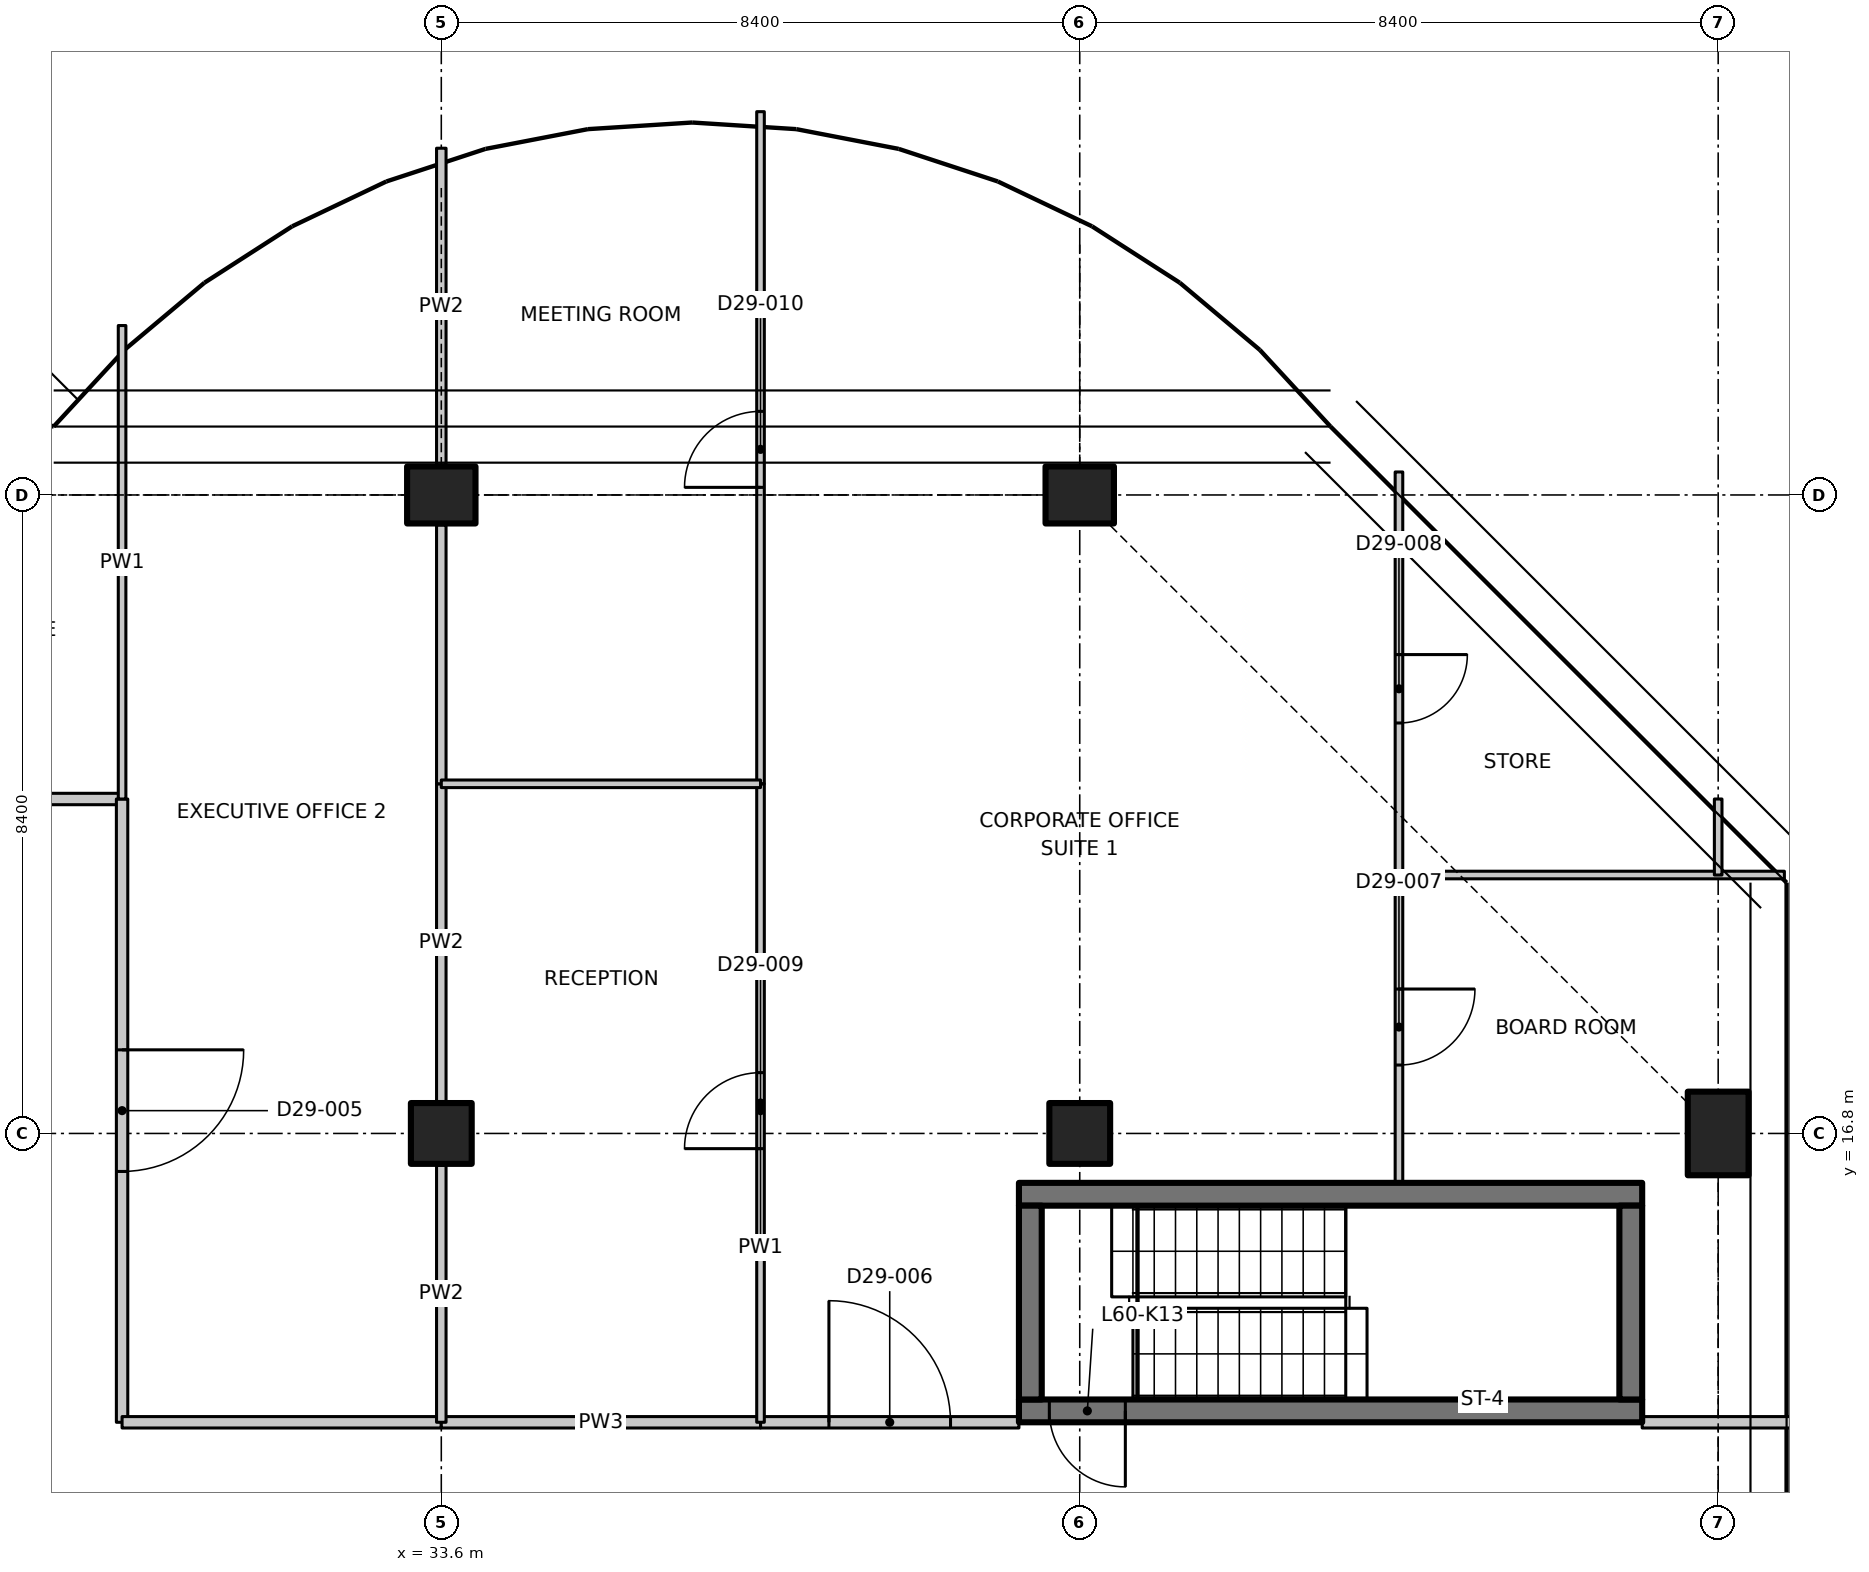
"""IFC4 building model, lengths in metres.
Left out: names, types, materials, properties, quantities, classifications, styles, units other than length and angle.
Written with IfcOpenShell. Run it as: python <this file> out.ifc"""

import sys

from ifc_helpers import new_model, si_unit, direction, frame, frame_2d, origin, origin_2d, place, context, subcontext, project, spatial, polyline, rectangle, outline, extrude, element, fill, save


model = new_model("IFC4")
c1 = context("Model", 3, precision=1e-05, world=origin(), true_north=direction((0.0, 1.0)))
c2 = subcontext(c1, "Body", "Model", "MODEL_VIEW")
j1 = project(units=[si_unit("LENGTHUNIT", "METRE"), si_unit("PLANEANGLEUNIT", "RADIAN")], contexts=[c1])
p1 = place(None, origin())
s1 = spatial("IfcSite", under=j1, at=p1, CompositionType="ELEMENT")
p2 = place(p1, origin())
s2 = spatial("IfcBuilding", under=s1, at=p2, CompositionType="ELEMENT")
p3 = place(p2, frame((0.0, 0.0, 237.3)))
s3 = spatial("IfcBuildingStorey", under=s2, at=p3, CompositionType="ELEMENT", Elevation=237.3)
p4 = place(p3, frame((33.6, 16.8, 0.0), z_axis=(0.0, 0.0, 1.0), x_axis=(1.0, 0.0, 0.0)))
e1 = element("IfcColumn", 1, at=p4, inside=s3, PredefinedType="COLUMN", context=c2, shape_type="SweptSolid", body=[
    extrude(rectangle(XDim=0.8, YDim=0.8, at=origin_2d()), origin(), (0.0, 0.0, 1.0), 3.35),
])
p5 = place(p3, frame((33.6, 25.2, 0.0), z_axis=(0.0, 0.0, 1.0), x_axis=(0.0, 1.0, 0.0)))
e2 = element("IfcColumn", 2, at=p5, inside=s3, PredefinedType="COLUMN", context=c2, shape_type="SweptSolid", body=[
    extrude(rectangle(XDim=0.75, YDim=0.9, at=origin_2d()), origin(), (0.0, 0.0, 1.0), 3.35),
])
p6 = place(p3, frame((42.0, 16.8, 0.0), z_axis=(0.0, 0.0, 1.0), x_axis=(1.0, 0.0, 0.0)))
e3 = element("IfcColumn", 3, at=p6, inside=s3, PredefinedType="COLUMN", context=c2, shape_type="SweptSolid", body=[
    extrude(rectangle(XDim=0.8, YDim=0.8, at=origin_2d()), origin(), (0.0, 0.0, 1.0), 3.35),
])
p7 = place(p3, frame((42.0, 25.2, 0.0), z_axis=(0.0, 0.0, 1.0), x_axis=(0.0, 1.0, 0.0)))
e4 = element("IfcColumn", 4, at=p7, inside=s3, PredefinedType="COLUMN", context=c2, shape_type="SweptSolid", body=[
    extrude(rectangle(XDim=0.75, YDim=0.9, at=origin_2d()), origin(), (0.0, 0.0, 1.0), 3.35),
])
p8 = place(p3, frame((50.4, 16.8, 0.0), z_axis=(0.0, 0.0, 1.0), x_axis=(1.0, 0.0, 0.0)))
e5 = element("IfcColumn", 5, at=p8, inside=s3, PredefinedType="COLUMN", context=c2, shape_type="SweptSolid", body=[
    extrude(rectangle(XDim=0.8, YDim=1.1, at=origin_2d()), origin(), (0.0, 0.0, 1.0), 3.35),
])
p9 = place(p3, frame((49.4, 13.15, 0.0), z_axis=(0.0, 0.0, 1.0), x_axis=(-1.0, 0.0, 0.0)))
e6 = element("IfcWall", 6, at=p9, inside=s3, PredefinedType="SHEAR", context=c2, shape_type="SweptSolid", body=[
    extrude(rectangle(XDim=8.2, YDim=0.3, at=frame_2d((4.1, 0.0))), origin(), (0.0, 0.0, 1.0), 3.35),
])
p10 = place(p9, frame((6.8, 0.0, 0.0)))
e7 = element("IfcOpeningElement", 7, at=p10, cuts=e6, PredefinedType="OPENING", context=c2, shape_type="SweptSolid", body=[
    extrude(rectangle(XDim=1.0, YDim=2.1, at=frame_2d((0.5, 1.05))), frame((0.0, 0.16, 0.0), z_axis=(0.0, -1.0, 0.0), x_axis=(1.0, 0.0, 0.0)), (0.0, 0.0, 1.0), 0.32),
])
p11 = place(p3, frame((41.2, 16.0, 0.0), z_axis=(0.0, 0.0, 1.0), x_axis=(1.0, 0.0, 0.0)))
e8 = element("IfcWall", 8, at=p11, inside=s3, PredefinedType="SHEAR", context=c2, shape_type="SweptSolid", body=[
    extrude(rectangle(XDim=8.2, YDim=0.3, at=frame_2d((4.1, 0.0))), origin(), (0.0, 0.0, 1.0), 3.35),
])
for number, where, z_axis, x_axis in (
    (9, (41.35, 13.3, 0.0), (0.0, 0.0, 1.0), (0.0, 1.0, 0.0)),
    (10, (49.25, 13.3, 0.0), (0.0, 0.0, 1.0), (0.0, 1.0, 0.0)),
):
    element("IfcWall", number, at=place(p3, frame(where, z_axis=z_axis, x_axis=x_axis)), inside=s3, PredefinedType="SHEAR", context=c2, shape_type="SweptSolid", body=[
        extrude(rectangle(XDim=2.55, YDim=0.3, at=frame_2d((1.275, 0.0))), origin(), (0.0, 0.0, 1.0), 3.35),
    ])
p12 = place(p3, frame((25.2, 21.2, 0.0), z_axis=(0.0, 0.0, 1.0), x_axis=(1.0, 0.0, 0.0)))
e11 = element("IfcWall", 11, at=p12, inside=s3, PredefinedType="PARTITIONING", context=c2, shape_type="SweptSolid", body=[
    extrude(rectangle(XDim=4.2, YDim=0.15, at=frame_2d((2.1, 0.0))), origin(), (0.0, 0.0, 1.0), 3.33),
])
p13 = place(p12, frame((1.5, 0.0, 0.0)))
e12 = element("IfcOpeningElement", 12, at=p13, cuts=e11, PredefinedType="OPENING", context=c2, shape_type="SweptSolid", body=[
    extrude(rectangle(XDim=1.0, YDim=2.1, at=frame_2d((0.5, 1.05))), frame((0.0, 0.085, 0.0), z_axis=(0.0, -1.0, 0.0), x_axis=(1.0, 0.0, 0.0)), (0.0, 0.0, 1.0), 0.17),
])
p14 = place(p3, frame((29.4, 21.2, 0.0), z_axis=(0.0, 0.0, 1.0), x_axis=(0.0, -1.0, 0.0)))
e13 = element("IfcWall", 13, at=p14, inside=s3, PredefinedType="PARTITIONING", context=c2, shape_type="SweptSolid", body=[
    extrude(rectangle(XDim=8.2, YDim=0.15, at=frame_2d((4.1, 0.0))), origin(), (0.0, 0.0, 1.0), 3.33),
])
p15 = place(p14, frame((3.3, 0.0, 0.0)))
e14 = element("IfcOpeningElement", 14, at=p15, cuts=e13, PredefinedType="OPENING", context=c2, shape_type="SweptSolid", body=[
    extrude(rectangle(XDim=1.6, YDim=2.1, at=frame_2d((0.8, 1.05))), frame((0.0, 0.085, 0.0), z_axis=(0.0, -1.0, 0.0), x_axis=(1.0, 0.0, 0.0)), (0.0, 0.0, 1.0), 0.17),
])
p16 = place(p3, frame((29.4, 27.429, 0.0), z_axis=(0.0, 0.0, 1.0), x_axis=(0.0, -1.0, 0.0)))
e15 = element("IfcWall", 15, at=p16, inside=s3, PredefinedType="PARTITIONING", context=c2, shape_type="SweptSolid", body=[
    extrude(outline(polyline([(0.0, 0.0), (6.229, 0.0), (6.229, 3.33), (2.679, 3.33), (2.677, 2.98), (1.781, 2.98), (1.779, 3.33), (0.154, 3.33), (0.0, 3.33), (0.0, 0.0)])), frame((0.0, 0.05, 0.0), z_axis=(0.0, -1.0, 0.0), x_axis=(1.0, 0.0, 0.0)), (0.0, 0.0, 1.0), 0.1),
])
p17 = place(p3, frame((29.4, 13.0, 0.0), z_axis=(0.0, 0.0, 1.0), x_axis=(1.0, 0.0, 0.0)))
e16 = element("IfcWall", 16, at=p17, inside=s3, PredefinedType="PARTITIONING", context=c2, shape_type="SweptSolid", body=[
    extrude(rectangle(XDim=4.2, YDim=0.15, at=frame_2d((2.1, 0.0))), origin(), (0.0, 0.0, 1.0), 3.33),
])
p18 = place(p3, frame((37.8, 13.0, 0.0), z_axis=(0.0, 0.0, 1.0), x_axis=(1.0, 0.0, 0.0)))
e17 = element("IfcWall", 17, at=p18, inside=s3, PredefinedType="PARTITIONING", context=c2, shape_type="SweptSolid", body=[
    extrude(rectangle(XDim=3.4, YDim=0.15, at=frame_2d((1.7, 0.0))), origin(), (0.0, 0.0, 1.0), 3.33),
])
p19 = place(p18, frame((0.9, 0.0, 0.0)))
e18 = element("IfcOpeningElement", 18, at=p19, cuts=e17, PredefinedType="OPENING", context=c2, shape_type="SweptSolid", body=[
    extrude(rectangle(XDim=1.6, YDim=2.1, at=frame_2d((0.8, 1.05))), frame((0.0, 0.085, 0.0), z_axis=(0.0, -1.0, 0.0), x_axis=(1.0, 0.0, 0.0)), (0.0, 0.0, 1.0), 0.17),
])
p20 = place(p3, frame((49.4, 13.0, 0.0), z_axis=(0.0, 0.0, 1.0), x_axis=(1.0, 0.0, 0.0)))
e19 = element("IfcWall", 19, at=p20, inside=s3, PredefinedType="PARTITIONING", context=c2, shape_type="SweptSolid", body=[
    extrude(rectangle(XDim=2.42, YDim=0.15, at=frame_2d((1.21, 0.0))), origin(), (0.0, 0.0, 1.0), 2.98),
])
p21 = place(p3, frame((33.6, 13.0, 0.0), z_axis=(0.0, 0.0, 1.0), x_axis=(1.0, 0.0, 0.0)))
e20 = element("IfcWall", 20, at=p21, inside=s3, PredefinedType="PARTITIONING", context=c2, shape_type="SweptSolid", body=[
    extrude(rectangle(XDim=4.2, YDim=0.15, at=frame_2d((2.1, 0.0))), origin(), (0.0, 0.0, 1.0), 3.33),
])
p22 = place(p3, frame((33.6, 21.4, 0.0), z_axis=(0.0, 0.0, 1.0), x_axis=(0.0, -1.0, 0.0)))
e21 = element("IfcWall", 21, at=p22, inside=s3, PredefinedType="PARTITIONING", context=c2, shape_type="SweptSolid", body=[
    extrude(rectangle(XDim=4.18, YDim=0.125, at=frame_2d((2.09, 0.0))), origin(), (0.0, 0.0, 1.0), 3.33),
])
p23 = place(p3, frame((33.6, 16.38, 0.0), z_axis=(0.0, 0.0, 1.0), x_axis=(0.0, -1.0, 0.0)))
e22 = element("IfcWall", 22, at=p23, inside=s3, PredefinedType="PARTITIONING", context=c2, shape_type="SweptSolid", body=[
    extrude(rectangle(XDim=3.38, YDim=0.125, at=frame_2d((1.69, 0.0))), origin(), (0.0, 0.0, 1.0), 3.33),
])
p24 = place(p3, frame((33.6, 29.762, 0.0), z_axis=(0.0, 0.0, 1.0), x_axis=(0.0, -1.0, 0.0)))
e23 = element("IfcWall", 23, at=p24, inside=s3, PredefinedType="PARTITIONING", context=c2, shape_type="SweptSolid", body=[
    extrude(rectangle(XDim=4.167, YDim=0.125, at=frame_2d((2.083, 0.0))), origin(), (0.0, 0.0, 1.0), 2.98),
])
p25 = place(p3, frame((33.6, 24.805, 0.0), z_axis=(0.0, 0.0, 1.0), x_axis=(0.0, -1.0, 0.0)))
e24 = element("IfcWall", 24, at=p25, inside=s3, PredefinedType="PARTITIONING", context=c2, shape_type="SweptSolid", body=[
    extrude(rectangle(XDim=3.405, YDim=0.125, at=frame_2d((1.703, 0.0))), origin(), (0.0, 0.0, 1.0), 2.98),
])
p26 = place(p3, frame((46.2, 20.2, 0.0), z_axis=(0.0, 0.0, 1.0), x_axis=(0.0, -1.0, 0.0)))
e25 = element("IfcWall", 25, at=p26, inside=s3, PredefinedType="PARTITIONING", context=c2, shape_type="SweptSolid", body=[
    extrude(rectangle(XDim=4.05, YDim=0.1, at=frame_2d((2.025, 0.0))), origin(), (0.0, 0.0, 1.0), 3.33),
])
p27 = place(p26, frame((1.5, 0.0, 0.0)))
e26 = element("IfcOpeningElement", 26, at=p27, cuts=e25, PredefinedType="OPENING", context=c2, shape_type="SweptSolid", body=[
    extrude(rectangle(XDim=1.0, YDim=2.1, at=frame_2d((0.5, 1.05))), frame((0.0, 0.06, 0.0), z_axis=(0.0, -1.0, 0.0), x_axis=(1.0, 0.0, 0.0)), (0.0, 0.0, 1.0), 0.12),
])
p28 = place(p3, frame((46.2, 25.502, 0.0), z_axis=(0.0, 0.0, 1.0), x_axis=(0.0, -1.0, 0.0)))
e27 = element("IfcWall", 27, at=p28, inside=s3, PredefinedType="PARTITIONING", context=c2, shape_type="SweptSolid", body=[
    extrude(outline(polyline([(0.0, 0.0), (5.302, 0.0), (5.302, 3.33), (5.168, 3.33), (5.166, 2.98), (3.839, 2.98), (3.837, 3.33), (0.103, 3.33), (0.0, 3.33), (0.0, 0.0)])), frame((0.0, 0.05, 0.0), z_axis=(0.0, -1.0, 0.0), x_axis=(1.0, 0.0, 0.0)), (0.0, 0.0, 1.0), 0.1),
])
p29 = place(p28, frame((2.403, 0.0, 0.0)))
e28 = element("IfcOpeningElement", 28, at=p29, cuts=e27, PredefinedType="OPENING", context=c2, shape_type="SweptSolid", body=[
    extrude(rectangle(XDim=0.9, YDim=2.1, at=frame_2d((0.45, 1.05))), frame((0.0, 0.06, 0.0), z_axis=(0.0, -1.0, 0.0), x_axis=(1.0, 0.0, 0.0)), (0.0, 0.0, 1.0), 0.12),
])
p30 = place(p3, frame((37.8, 13.0, 0.0), z_axis=(0.0, 0.0, 1.0), x_axis=(0.0, 1.0, 0.0)))
e29 = element("IfcWall", 29, at=p30, inside=s3, PredefinedType="PARTITIONING", context=c2, shape_type="SweptSolid", body=[
    extrude(rectangle(XDim=8.4, YDim=0.1, at=frame_2d((4.2, 0.0))), origin(), (0.0, 0.0, 1.0), 3.33),
])
p31 = place(p30, frame((3.6, 0.0, 0.0)))
e30 = element("IfcOpeningElement", 30, at=p31, cuts=e29, PredefinedType="OPENING", context=c2, shape_type="SweptSolid", body=[
    extrude(rectangle(XDim=1.0, YDim=2.1, at=frame_2d((0.5, 1.05))), frame((0.0, 0.06, 0.0), z_axis=(0.0, -1.0, 0.0), x_axis=(1.0, 0.0, 0.0)), (0.0, 0.0, 1.0), 0.12),
])
p32 = place(p3, frame((37.8, 21.4, 0.0), z_axis=(0.0, 0.0, 1.0), x_axis=(0.0, 1.0, 0.0)))
e31 = element("IfcWall", 31, at=p32, inside=s3, PredefinedType="PARTITIONING", context=c2, shape_type="SweptSolid", body=[
    extrude(outline(polyline([(0.0, 0.0), (8.843, 0.0), (8.843, 3.33), (4.25, 3.33), (4.248, 2.98), (3.352, 2.98), (3.35, 3.33), (0.0, 3.33), (0.0, 0.0)])), frame((0.0, 0.05, 0.0), z_axis=(0.0, -1.0, 0.0), x_axis=(1.0, 0.0, 0.0)), (0.0, 0.0, 1.0), 0.1),
])
p33 = place(p32, frame((3.9, 0.0, 0.0)))
e32 = element("IfcOpeningElement", 32, at=p33, cuts=e31, PredefinedType="OPENING", context=c2, shape_type="SweptSolid", body=[
    extrude(rectangle(XDim=1.0, YDim=2.1, at=frame_2d((0.5, 1.05))), frame((0.0, 0.06, 0.0), z_axis=(0.0, -1.0, 0.0), x_axis=(1.0, 0.0, 0.0)), (0.0, 0.0, 1.0), 0.12),
])
p34 = place(p3, frame((46.2, 20.2, 0.0), z_axis=(0.0, 0.0, 1.0), x_axis=(1.0, 0.0, 0.0)))
e33 = element("IfcWall", 33, at=p34, inside=s3, PredefinedType="PARTITIONING", context=c2, shape_type="SweptSolid", body=[
    extrude(rectangle(XDim=5.071, YDim=0.1, at=frame_2d((2.536, 0.0))), origin(), (0.0, 0.0, 1.0), 2.98),
])
p35 = place(p3, frame((50.4, 20.2, 0.0), z_axis=(0.0, 0.0, 1.0), x_axis=(0.0, 1.0, 0.0)))
e34 = element("IfcWall", 34, at=p35, inside=s3, PredefinedType="PARTITIONING", context=c2, shape_type="SweptSolid", body=[
    extrude(rectangle(XDim=1.0, YDim=0.1, at=frame_2d((0.5, 0.0))), origin(), (0.0, 0.0, 1.0), 3.33),
])
p36 = place(p3, frame((33.6, 21.4, 0.0), z_axis=(0.0, 0.0, 1.0), x_axis=(1.0, 0.0, 0.0)))
e35 = element("IfcWall", 35, at=p36, inside=s3, PredefinedType="PARTITIONING", context=c2, shape_type="SweptSolid", body=[
    extrude(rectangle(XDim=4.2, YDim=0.1, at=frame_2d((2.1, 0.0))), origin(), (0.0, 0.0, 1.0), 3.33),
])
p37 = place(p10, origin())
e36 = element("IfcDoor", 36, at=p37, inside=s3, OperationType="SINGLE_SWING_RIGHT", PredefinedType="DOOR", context=c2, shape_type="SweptSolid", body=[
    extrude(rectangle(XDim=1.0, YDim=2.1, at=frame_2d((0.5, 1.05))), frame((0.0, 0.025, 0.0), z_axis=(0.0, -1.0, 0.0), x_axis=(1.0, 0.0, 0.0)), (0.0, 0.0, 1.0), 0.05),
])
fill(e7, e36)
p38 = place(p15, origin())
e37 = element("IfcDoor", 37, at=p38, inside=s3, OperationType="DOUBLE_DOOR_SINGLE_SWING", PredefinedType="DOOR", context=c2, shape_type="SweptSolid", body=[
    extrude(rectangle(XDim=1.6, YDim=2.1, at=frame_2d((0.8, 1.05))), frame((0.0, 0.025, 0.0), z_axis=(0.0, -1.0, 0.0), x_axis=(1.0, 0.0, 0.0)), (0.0, 0.0, 1.0), 0.05),
])
fill(e14, e37)
p39 = place(p19, origin())
e38 = element("IfcDoor", 38, at=p39, inside=s3, OperationType="DOUBLE_DOOR_SINGLE_SWING", PredefinedType="DOOR", context=c2, shape_type="SweptSolid", body=[
    extrude(rectangle(XDim=1.6, YDim=2.1, at=frame_2d((0.8, 1.05))), frame((0.0, 0.025, 0.0), z_axis=(0.0, -1.0, 0.0), x_axis=(1.0, 0.0, 0.0)), (0.0, 0.0, 1.0), 0.05),
])
fill(e18, e38)
p40 = place(p27, origin())
e39 = element("IfcDoor", 39, at=p40, inside=s3, OperationType="SINGLE_SWING_LEFT", PredefinedType="DOOR", context=c2, shape_type="SweptSolid", body=[
    extrude(rectangle(XDim=1.0, YDim=2.1, at=frame_2d((0.5, 1.05))), frame((0.0, 0.025, 0.0), z_axis=(0.0, -1.0, 0.0), x_axis=(1.0, 0.0, 0.0)), (0.0, 0.0, 1.0), 0.05),
])
fill(e26, e39)
p41 = place(p29, origin())
e40 = element("IfcDoor", 40, at=p41, inside=s3, OperationType="SINGLE_SWING_LEFT", PredefinedType="DOOR", context=c2, shape_type="SweptSolid", body=[
    extrude(rectangle(XDim=0.9, YDim=2.1, at=frame_2d((0.45, 1.05))), frame((0.0, 0.025, 0.0), z_axis=(0.0, -1.0, 0.0), x_axis=(1.0, 0.0, 0.0)), (0.0, 0.0, 1.0), 0.05),
])
fill(e28, e40)
p42 = place(p31, origin())
e41 = element("IfcDoor", 41, at=p42, inside=s3, OperationType="SINGLE_SWING_LEFT", PredefinedType="DOOR", context=c2, shape_type="SweptSolid", body=[
    extrude(rectangle(XDim=1.0, YDim=2.1, at=frame_2d((0.5, 1.05))), frame((0.0, 0.025, 0.0), z_axis=(0.0, -1.0, 0.0), x_axis=(1.0, 0.0, 0.0)), (0.0, 0.0, 1.0), 0.05),
])
fill(e30, e41)
p43 = place(p33, origin())
e42 = element("IfcDoor", 42, at=p43, inside=s3, OperationType="SINGLE_SWING_LEFT", PredefinedType="DOOR", context=c2, shape_type="SweptSolid", body=[
    extrude(rectangle(XDim=1.0, YDim=2.1, at=frame_2d((0.5, 1.05))), frame((0.0, 0.025, 0.0), z_axis=(0.0, -1.0, 0.0), x_axis=(1.0, 0.0, 0.0)), (0.0, 0.0, 1.0), 0.05),
])
fill(e32, e42)
save(model, sys.argv[1])
